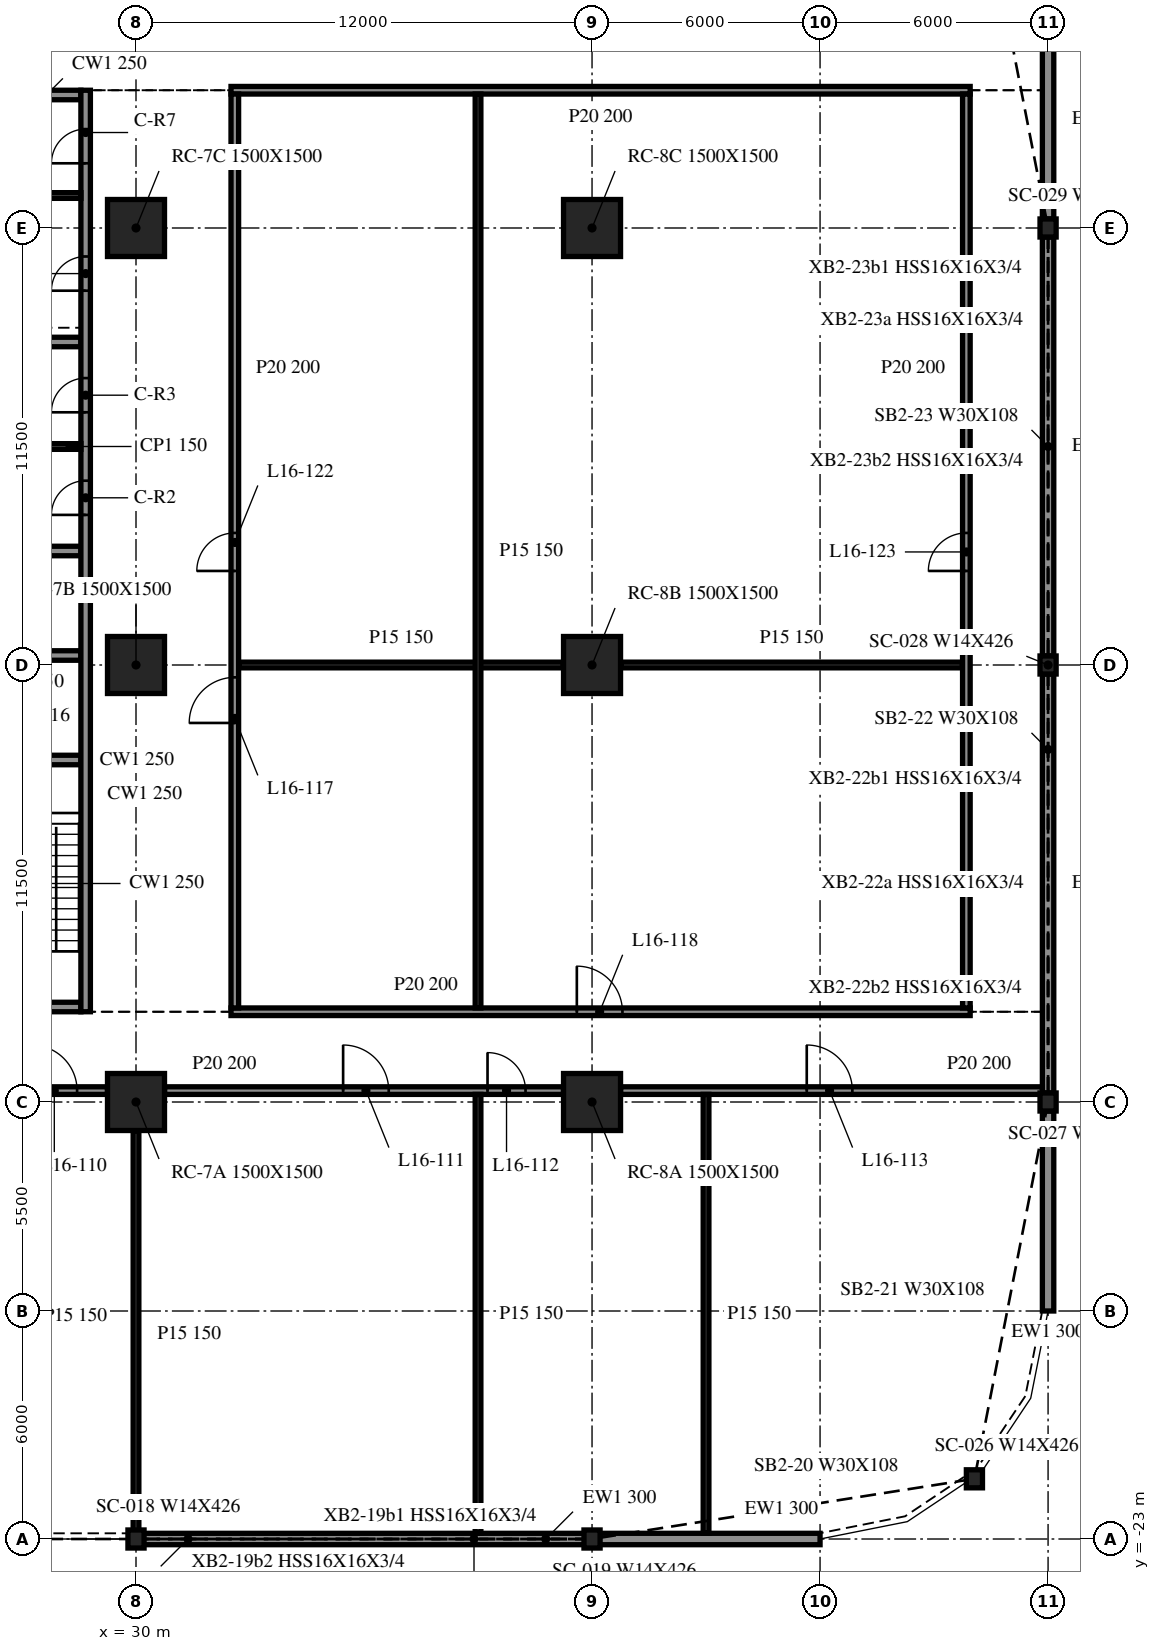
"""IFC4 building model, lengths in metres.
Left out: names, types, materials, properties, quantities, classifications, styles, units other than length and angle.
Written with IfcOpenShell. Run it as: python <this file> out.ifc"""

import sys

from ifc_helpers import new_model, si_unit, direction, frame, frame_2d, origin, origin_2d, place, context, subcontext, project, spatial, rectangle, i_section, extrude, element, fill, save


model = new_model("IFC4")
c1 = context("Model", 3, precision=1e-05, world=origin(), true_north=direction((0.0, 1.0)))
c2 = subcontext(c1, "Body", "Model", "MODEL_VIEW")
j1 = project(units=[si_unit("LENGTHUNIT", "METRE"), si_unit("PLANEANGLEUNIT", "RADIAN")], contexts=[c1])
p1 = place(None, origin())
s1 = spatial("IfcSite", under=j1, at=p1, CompositionType="ELEMENT")
p2 = place(p1, origin())
s2 = spatial("IfcBuilding", under=s1, at=p2, CompositionType="ELEMENT")
p3 = place(p2, frame((0.0, 0.0, 71.8)))
s3 = spatial("IfcBuildingStorey", under=s2, at=p3, CompositionType="ELEMENT", Elevation=71.8)
for number, where, z_axis, x_axis in (
    (1, (30.0, -11.5, -0.34), (0.0, 0.0, 1.0), (1.0, 0.0, 0.0)),
    (2, (30.0, 0.0, -0.34), (0.0, 0.0, 1.0), (1.0, 0.0, 0.0)),
    (3, (30.0, 11.5, -0.34), (0.0, 0.0, 1.0), (1.0, 0.0, 0.0)),
    (4, (42.0, -11.5, -0.34), (0.0, 0.0, 1.0), (1.0, 0.0, 0.0)),
    (5, (42.0, 0.0, -0.34), (0.0, 0.0, 1.0), (1.0, 0.0, 0.0)),
    (6, (42.0, 11.5, -0.34), (0.0, 0.0, 1.0), (1.0, 0.0, 0.0)),
):
    element("IfcColumn", number, at=place(p3, frame(where, z_axis=z_axis, x_axis=x_axis)), inside=s3, PredefinedType="COLUMN", context=c2, shape_type="SweptSolid", body=[
        extrude(rectangle(XDim=1.5, YDim=1.5, at=origin_2d()), origin(), (0.0, 0.0, 1.0), 4.3),
    ])
for number, where, z_axis, x_axis in (
    (7, (30.0, -23.0, -0.34), (0.0, 0.0, 1.0), (1.0, 0.0, 0.0)),
    (8, (42.0, -23.0, -0.34), (0.0, 0.0, 1.0), (1.0, 0.0, 0.0)),
    (9, (52.062, -21.416, -0.34), (0.0, 0.0, 1.0), (1.0, 0.0, 0.0)),
    (10, (54.0, -11.5, -0.34), (0.0, 0.0, 1.0), (1.0, 0.0, 0.0)),
    (11, (54.0, 0.0, -0.34), (0.0, 0.0, 1.0), (1.0, 0.0, 0.0)),
    (12, (54.0, 11.5, -0.34), (0.0, 0.0, 1.0), (1.0, 0.0, 0.0)),
):
    element("IfcColumn", number, at=place(p3, frame(where, z_axis=z_axis, x_axis=x_axis)), inside=s3, PredefinedType="COLUMN", context=c2, shape_type="SweptSolid", body=[
        extrude(i_section(OverallWidth=0.424, OverallDepth=0.475, WebThickness=0.048, FlangeThickness=0.077, at=origin_2d()), origin(), (0.0, 0.0, 1.0), 4.3),
    ])
p4 = place(p3, frame((30.024, -23.0, 0.0), z_axis=(0.0, 0.0, 1.0), x_axis=(1.0, 0.0, 0.0)))
e13 = element("IfcWall", 13, at=p4, inside=s3, PredefinedType="NOTDEFINED", context=c2, shape_type="SweptSolid", body=[
    extrude(rectangle(XDim=11.952, YDim=0.3, at=frame_2d((5.976, 0.0))), origin(), (0.0, 0.0, 1.0), 3.203),
])
p5 = place(p3, frame((42.024, -23.0, 0.0), z_axis=(0.0, 0.0, 1.0), x_axis=(1.0, 0.0, 0.0)))
e14 = element("IfcWall", 14, at=p5, inside=s3, PredefinedType="NOTDEFINED", context=c2, shape_type="SweptSolid", body=[
    extrude(rectangle(XDim=5.976, YDim=0.3, at=frame_2d((2.988, 0.0))), origin(), (0.0, 0.0, 1.0), 3.203),
])
p6 = place(p3, frame((54.0, -17.0, 0.0), z_axis=(0.0, 0.0, 1.0), x_axis=(0.0, 1.0, 0.0)))
e15 = element("IfcWall", 15, at=p6, inside=s3, PredefinedType="NOTDEFINED", context=c2, shape_type="SweptSolid", body=[
    extrude(rectangle(XDim=5.262, YDim=0.3, at=frame_2d((2.631, 0.0))), origin(), (0.0, 0.0, 1.0), 3.203),
])
for number, where, z_axis, x_axis in (
    (16, (54.0, -11.262, 0.0), (0.0, 0.0, 1.0), (0.0, 1.0, 0.0)),
    (17, (54.0, 0.238, 0.0), (0.0, 0.0, 1.0), (0.0, 1.0, 0.0)),
):
    element("IfcWall", number, at=place(p3, frame(where, z_axis=z_axis, x_axis=x_axis)), inside=s3, PredefinedType="NOTDEFINED", context=c2, shape_type="SweptSolid", body=[
        extrude(rectangle(XDim=11.024, YDim=0.3, at=frame_2d((5.512, 0.0))), origin(), (0.0, 0.0, 1.0), 3.203),
    ])
p7 = place(p3, frame((54.0, 11.738, 0.0), z_axis=(0.0, 0.0, 1.0), x_axis=(0.0, 1.0, 0.0)))
e18 = element("IfcWall", 18, at=p7, inside=s3, PredefinedType="NOTDEFINED", context=c2, shape_type="SweptSolid", body=[
    extrude(rectangle(XDim=5.262, YDim=0.3, at=frame_2d((2.631, 0.0))), origin(), (0.0, 0.0, 1.0), 3.203),
])
p8 = place(p3, frame((28.675, -9.125, 0.0), z_axis=(0.0, 0.0, 1.0), x_axis=(0.0, 1.0, 0.0)))
e19 = element("IfcWall", 19, at=p8, inside=s3, PredefinedType="SOLIDWALL", context=c2, shape_type="SweptSolid", body=[
    extrude(rectangle(XDim=24.25, YDim=0.25, at=frame_2d((12.125, 0.0))), origin(), (0.0, 0.0, 1.0), 3.96),
])
p9 = place(p8, frame((13.075, 0.0, 0.0)))
e20 = element("IfcOpeningElement", 20, at=p9, cuts=e19, PredefinedType="OPENING", context=c2, shape_type="SweptSolid", body=[
    extrude(rectangle(XDim=0.9, YDim=2.1, at=frame_2d((0.45, 1.05))), frame((0.0, 0.135, 0.0), z_axis=(0.0, -1.0, 0.0), x_axis=(1.0, 0.0, 0.0)), (0.0, 0.0, 1.0), 0.27),
])
p10 = place(p8, frame((15.775, 0.0, 0.0)))
e21 = element("IfcOpeningElement", 21, at=p10, cuts=e19, PredefinedType="OPENING", context=c2, shape_type="SweptSolid", body=[
    extrude(rectangle(XDim=0.9, YDim=2.1, at=frame_2d((0.45, 1.05))), frame((0.0, 0.135, 0.0), z_axis=(0.0, -1.0, 0.0), x_axis=(1.0, 0.0, 0.0)), (0.0, 0.0, 1.0), 0.27),
])
p11 = place(p8, frame((18.975, 0.0, 0.0)))
e22 = element("IfcOpeningElement", 22, at=p11, cuts=e19, PredefinedType="OPENING", context=c2, shape_type="SweptSolid", body=[
    extrude(rectangle(XDim=0.9, YDim=2.1, at=frame_2d((0.45, 1.05))), frame((0.0, 0.135, 0.0), z_axis=(0.0, -1.0, 0.0), x_axis=(1.0, 0.0, 0.0)), (0.0, 0.0, 1.0), 0.27),
])
p12 = place(p8, frame((22.327, 0.0, 0.0)))
e23 = element("IfcOpeningElement", 23, at=p12, cuts=e19, PredefinedType="OPENING", context=c2, shape_type="SweptSolid", body=[
    extrude(rectangle(XDim=0.9, YDim=2.1, at=frame_2d((0.45, 1.05))), frame((0.0, 0.135, 0.0), z_axis=(0.0, -1.0, 0.0), x_axis=(1.0, 0.0, 0.0)), (0.0, 0.0, 1.0), 0.27),
])
p13 = place(p3, frame((28.55, -9.0, 0.0), z_axis=(0.0, 0.0, 1.0), x_axis=(-1.0, 0.0, 0.0)))
e24 = element("IfcWall", 24, at=p13, inside=s3, PredefinedType="SOLIDWALL", context=c2, shape_type="SweptSolid", body=[
    extrude(rectangle(XDim=9.1, YDim=0.25, at=frame_2d((4.55, 0.0))), origin(), (0.0, 0.0, 1.0), 3.96),
])
p14 = place(p13, frame((3.65, 0.0, 0.0)))
e25 = element("IfcOpeningElement", 25, at=p14, cuts=e24, PredefinedType="OPENING", context=c2, shape_type="SweptSolid", body=[
    extrude(rectangle(XDim=1.8, YDim=2.1, at=frame_2d((0.9, 1.05))), frame((0.0, 0.135, 0.0), z_axis=(0.0, -1.0, 0.0), x_axis=(1.0, 0.0, 0.0)), (0.0, 0.0, 1.0), 0.27),
])
p15 = place(p3, frame((19.45, 15.0, 0.0), z_axis=(0.0, 0.0, 1.0), x_axis=(1.0, 0.0, 0.0)))
e26 = element("IfcWall", 26, at=p15, inside=s3, PredefinedType="SOLIDWALL", context=c2, shape_type="SweptSolid", body=[
    extrude(rectangle(XDim=9.1, YDim=0.25, at=frame_2d((4.55, 0.0))), origin(), (0.0, 0.0, 1.0), 3.96),
])
p16 = place(p15, frame((3.65, 0.0, 0.0)))
e27 = element("IfcOpeningElement", 27, at=p16, cuts=e26, PredefinedType="OPENING", context=c2, shape_type="SweptSolid", body=[
    extrude(rectangle(XDim=1.8, YDim=2.1, at=frame_2d((0.9, 1.05))), frame((0.0, 0.135, 0.0), z_axis=(0.0, -1.0, 0.0), x_axis=(1.0, 0.0, 0.0)), (0.0, 0.0, 1.0), 0.27),
])
for number, where, z_axis, x_axis in (
    (28, (25.7, -2.5, 0.0), (0.0, 0.0, 1.0), (1.0, 0.0, 0.0)),
    (29, (25.7, 0.25, 0.0), (0.0, 0.0, 1.0), (1.0, 0.0, 0.0)),
    (30, (25.7, 3.0, 0.0), (0.0, 0.0, 1.0), (1.0, 0.0, 0.0)),
    (31, (25.7, 8.5, 0.0), (0.0, 0.0, 1.0), (1.0, 0.0, 0.0)),
):
    element("IfcWall", number, at=place(p3, frame(where, z_axis=z_axis, x_axis=x_axis)), inside=s3, PredefinedType="SOLIDWALL", context=c2, shape_type="SweptSolid", body=[
        extrude(rectangle(XDim=2.85, YDim=0.25, at=frame_2d((1.425, 0.0))), origin(), (0.0, 0.0, 1.0), 3.96),
    ])
for number, where, z_axis, x_axis in (
    (32, (25.7, 5.75, 0.0), (0.0, 0.0, 1.0), (1.0, 0.0, 0.0)),
    (33, (25.7, 12.355, 0.0), (0.0, 0.0, 1.0), (1.0, 0.0, 0.0)),
):
    element("IfcWall", number, at=place(p3, frame(where, z_axis=z_axis, x_axis=x_axis)), inside=s3, PredefinedType="PARTITIONING", context=c2, shape_type="SweptSolid", body=[
        extrude(rectangle(XDim=2.85, YDim=0.15, at=frame_2d((1.425, 0.0))), origin(), (0.0, 0.0, 1.0), 3.96),
    ])
p17 = place(p3, frame((18.75, -11.2, 0.0), z_axis=(0.0, 0.0, 1.0), x_axis=(1.0, 0.0, 0.0)))
e34 = element("IfcWall", 34, at=p17, inside=s3, PredefinedType="PARTITIONING", context=c2, shape_type="SweptSolid", body=[
    extrude(rectangle(XDim=10.5, YDim=0.2, at=frame_2d((5.25, 0.0))), origin(), (0.0, 0.0, 1.0), 3.96),
])
p18 = place(p17, frame((4.7, 0.0, 0.0)))
e35 = element("IfcOpeningElement", 35, at=p18, cuts=e34, PredefinedType="OPENING", context=c2, shape_type="SweptSolid", body=[
    extrude(rectangle(XDim=1.2, YDim=2.1, at=frame_2d((0.6, 1.05))), frame((0.0, 0.11, 0.0), z_axis=(0.0, -1.0, 0.0), x_axis=(1.0, 0.0, 0.0)), (0.0, 0.0, 1.0), 0.22),
])
p19 = place(p17, frame((8.5, 0.0, 0.0)))
e36 = element("IfcOpeningElement", 36, at=p19, cuts=e34, PredefinedType="OPENING", context=c2, shape_type="SweptSolid", body=[
    extrude(rectangle(XDim=1.2, YDim=2.1, at=frame_2d((0.6, 1.05))), frame((0.0, 0.11, 0.0), z_axis=(0.0, -1.0, 0.0), x_axis=(1.0, 0.0, 0.0)), (0.0, 0.0, 1.0), 0.22),
])
p20 = place(p3, frame((30.75, -11.2, 0.0), z_axis=(0.0, 0.0, 1.0), x_axis=(1.0, 0.0, 0.0)))
e37 = element("IfcWall", 37, at=p20, inside=s3, PredefinedType="PARTITIONING", context=c2, shape_type="SweptSolid", body=[
    extrude(rectangle(XDim=10.5, YDim=0.2, at=frame_2d((5.25, 0.0))), origin(), (0.0, 0.0, 1.0), 3.96),
])
p21 = place(p20, frame((4.7, 0.0, 0.0)))
e38 = element("IfcOpeningElement", 38, at=p21, cuts=e37, PredefinedType="OPENING", context=c2, shape_type="SweptSolid", body=[
    extrude(rectangle(XDim=1.2, YDim=2.1, at=frame_2d((0.6, 1.05))), frame((0.0, 0.11, 0.0), z_axis=(0.0, -1.0, 0.0), x_axis=(1.0, 0.0, 0.0)), (0.0, 0.0, 1.0), 0.22),
])
p22 = place(p20, frame((8.5, 0.0, 0.0)))
e39 = element("IfcOpeningElement", 39, at=p22, cuts=e37, PredefinedType="OPENING", context=c2, shape_type="SweptSolid", body=[
    extrude(rectangle(XDim=1.0, YDim=2.1, at=frame_2d((0.5, 1.05))), frame((0.0, 0.11, 0.0), z_axis=(0.0, -1.0, 0.0), x_axis=(1.0, 0.0, 0.0)), (0.0, 0.0, 1.0), 0.22),
])
p23 = place(p3, frame((42.75, -11.2, 0.0), z_axis=(0.0, 0.0, 1.0), x_axis=(1.0, 0.0, 0.0)))
e40 = element("IfcWall", 40, at=p23, inside=s3, PredefinedType="PARTITIONING", context=c2, shape_type="SweptSolid", body=[
    extrude(rectangle(XDim=11.1, YDim=0.2, at=frame_2d((5.55, 0.0))), origin(), (0.0, 0.0, 1.0), 3.96),
])
p24 = place(p23, frame((4.9, 0.0, 0.0)))
e41 = element("IfcOpeningElement", 41, at=p24, cuts=e40, PredefinedType="OPENING", context=c2, shape_type="SweptSolid", body=[
    extrude(rectangle(XDim=1.2, YDim=2.1, at=frame_2d((0.6, 1.05))), frame((0.0, 0.11, 0.0), z_axis=(0.0, -1.0, 0.0), x_axis=(1.0, 0.0, 0.0)), (0.0, 0.0, 1.0), 0.22),
])
p25 = place(p3, frame((32.5, -9.125, 0.0), z_axis=(0.0, 0.0, 1.0), x_axis=(1.0, 0.0, 0.0)))
e42 = element("IfcWall", 42, at=p25, inside=s3, PredefinedType="PARTITIONING", context=c2, shape_type="SweptSolid", body=[
    extrude(rectangle(XDim=19.45, YDim=0.2, at=frame_2d((9.725, 0.0))), origin(), (0.0, 0.0, 1.0), 3.96),
])
p26 = place(p25, frame((9.1, 0.0, 0.0)))
e43 = element("IfcOpeningElement", 43, at=p26, cuts=e42, PredefinedType="OPENING", context=c2, shape_type="SweptSolid", body=[
    extrude(rectangle(XDim=1.2, YDim=2.1, at=frame_2d((0.6, 1.05))), frame((0.0, 0.11, 0.0), z_axis=(0.0, -1.0, 0.0), x_axis=(1.0, 0.0, 0.0)), (0.0, 0.0, 1.0), 0.22),
])
p27 = place(p3, frame((32.7, 0.0, 0.0), z_axis=(0.0, 0.0, 1.0), x_axis=(1.0, 0.0, 0.0)))
e44 = element("IfcWall", 44, at=p27, inside=s3, PredefinedType="PARTITIONING", context=c2, shape_type="SweptSolid", body=[
    extrude(rectangle(XDim=8.55, YDim=0.15, at=frame_2d((4.275, 0.0))), origin(), (0.0, 0.0, 1.0), 3.96),
])
p28 = place(p3, frame((42.75, 0.0, 0.0), z_axis=(0.0, 0.0, 1.0), x_axis=(1.0, 0.0, 0.0)))
e45 = element("IfcWall", 45, at=p28, inside=s3, PredefinedType="PARTITIONING", context=c2, shape_type="SweptSolid", body=[
    extrude(rectangle(XDim=9.0, YDim=0.15, at=frame_2d((4.5, 0.0))), origin(), (0.0, 0.0, 1.0), 3.96),
])
p29 = place(p3, frame((32.5, 15.125, 0.0), z_axis=(0.0, 0.0, 1.0), x_axis=(1.0, 0.0, 0.0)))
e46 = element("IfcWall", 46, at=p29, inside=s3, PredefinedType="PARTITIONING", context=c2, shape_type="SweptSolid", body=[
    extrude(rectangle(XDim=19.45, YDim=0.2, at=frame_2d((9.725, 0.0))), origin(), (0.0, 0.0, 1.0), 3.96),
])
p30 = place(p3, frame((30.0, -22.975, 0.0), z_axis=(0.0, 0.0, 1.0), x_axis=(0.0, 1.0, 0.0)))
e47 = element("IfcWall", 47, at=p30, inside=s3, PredefinedType="PARTITIONING", context=c2, shape_type="SweptSolid", body=[
    extrude(rectangle(XDim=10.725, YDim=0.15, at=frame_2d((5.363, 0.0))), origin(), (0.0, 0.0, 1.0), 3.96),
])
p31 = place(p3, frame((32.6, -9.025, 0.0), z_axis=(0.0, 0.0, 1.0), x_axis=(0.0, 1.0, 0.0)))
e48 = element("IfcWall", 48, at=p31, inside=s3, PredefinedType="PARTITIONING", context=c2, shape_type="SweptSolid", body=[
    extrude(rectangle(XDim=24.05, YDim=0.2, at=frame_2d((12.025, 0.0))), origin(), (0.0, 0.0, 1.0), 3.96),
])
p32 = place(p31, frame((7.5, 0.0, 0.0)))
e49 = element("IfcOpeningElement", 49, at=p32, cuts=e48, PredefinedType="OPENING", context=c2, shape_type="SweptSolid", body=[
    extrude(rectangle(XDim=1.2, YDim=2.1, at=frame_2d((0.6, 1.05))), frame((0.0, 0.11, 0.0), z_axis=(0.0, -1.0, 0.0), x_axis=(1.0, 0.0, 0.0)), (0.0, 0.0, 1.0), 0.22),
])
p33 = place(p31, frame((11.5, 0.0, 0.0)))
e50 = element("IfcOpeningElement", 50, at=p33, cuts=e48, PredefinedType="OPENING", context=c2, shape_type="SweptSolid", body=[
    extrude(rectangle(XDim=1.0, YDim=2.1, at=frame_2d((0.5, 1.05))), frame((0.0, 0.11, 0.0), z_axis=(0.0, -1.0, 0.0), x_axis=(1.0, 0.0, 0.0)), (0.0, 0.0, 1.0), 0.22),
])
p34 = place(p3, frame((39.0, -22.85, 0.0), z_axis=(0.0, 0.0, 1.0), x_axis=(0.0, 1.0, 0.0)))
e51 = element("IfcWall", 51, at=p34, inside=s3, PredefinedType="PARTITIONING", context=c2, shape_type="SweptSolid", body=[
    extrude(rectangle(XDim=11.55, YDim=0.15, at=frame_2d((5.775, 0.0))), origin(), (0.0, 0.0, 1.0), 3.96),
])
p35 = place(p3, frame((39.0, -9.025, 0.0), z_axis=(0.0, 0.0, 1.0), x_axis=(0.0, 1.0, 0.0)))
e52 = element("IfcWall", 52, at=p35, inside=s3, PredefinedType="PARTITIONING", context=c2, shape_type="SweptSolid", body=[
    extrude(rectangle(XDim=24.05, YDim=0.15, at=frame_2d((12.025, 0.0))), origin(), (0.0, 0.0, 1.0), 3.96),
])
p36 = place(p3, frame((45.0, -22.85, 0.0), z_axis=(0.0, 0.0, 1.0), x_axis=(0.0, 1.0, 0.0)))
e53 = element("IfcWall", 53, at=p36, inside=s3, PredefinedType="PARTITIONING", context=c2, shape_type="SweptSolid", body=[
    extrude(rectangle(XDim=11.55, YDim=0.15, at=frame_2d((5.775, 0.0))), origin(), (0.0, 0.0, 1.0), 3.96),
])
p37 = place(p3, frame((51.85, -9.025, 0.0), z_axis=(0.0, 0.0, 1.0), x_axis=(0.0, 1.0, 0.0)))
e54 = element("IfcWall", 54, at=p37, inside=s3, PredefinedType="PARTITIONING", context=c2, shape_type="SweptSolid", body=[
    extrude(rectangle(XDim=24.05, YDim=0.2, at=frame_2d((12.025, 0.0))), origin(), (0.0, 0.0, 1.0), 3.96),
])
p38 = place(p37, frame((11.5, 0.0, 0.0)))
e55 = element("IfcOpeningElement", 55, at=p38, cuts=e54, PredefinedType="OPENING", context=c2, shape_type="SweptSolid", body=[
    extrude(rectangle(XDim=1.0, YDim=2.1, at=frame_2d((0.5, 1.05))), frame((0.0, 0.11, 0.0), z_axis=(0.0, -1.0, 0.0), x_axis=(1.0, 0.0, 0.0)), (0.0, 0.0, 1.0), 0.22),
])
p39 = place(p9, origin())
e56 = element("IfcDoor", 56, at=p39, inside=s3, OperationType="SINGLE_SWING_RIGHT", PredefinedType="DOOR", context=c2, shape_type="SweptSolid", body=[
    extrude(rectangle(XDim=0.9, YDim=2.1, at=frame_2d((0.45, 1.05))), frame((0.0, 0.025, 0.0), z_axis=(0.0, -1.0, 0.0), x_axis=(1.0, 0.0, 0.0)), (0.0, 0.0, 1.0), 0.05),
])
fill(e20, e56)
p40 = place(p10, origin())
e57 = element("IfcDoor", 57, at=p40, inside=s3, OperationType="SINGLE_SWING_LEFT", PredefinedType="DOOR", context=c2, shape_type="SweptSolid", body=[
    extrude(rectangle(XDim=0.9, YDim=2.1, at=frame_2d((0.45, 1.05))), frame((0.0, 0.025, 0.0), z_axis=(0.0, -1.0, 0.0), x_axis=(1.0, 0.0, 0.0)), (0.0, 0.0, 1.0), 0.05),
])
fill(e21, e57)
p41 = place(p11, origin())
e58 = element("IfcDoor", 58, at=p41, inside=s3, OperationType="SINGLE_SWING_RIGHT", PredefinedType="DOOR", context=c2, shape_type="SweptSolid", body=[
    extrude(rectangle(XDim=0.9, YDim=2.1, at=frame_2d((0.45, 1.05))), frame((0.0, 0.025, 0.0), z_axis=(0.0, -1.0, 0.0), x_axis=(1.0, 0.0, 0.0)), (0.0, 0.0, 1.0), 0.05),
])
fill(e22, e58)
p42 = place(p12, origin())
e59 = element("IfcDoor", 59, at=p42, inside=s3, OperationType="SINGLE_SWING_LEFT", PredefinedType="DOOR", context=c2, shape_type="SweptSolid", body=[
    extrude(rectangle(XDim=0.9, YDim=2.1, at=frame_2d((0.45, 1.05))), frame((0.0, 0.025, 0.0), z_axis=(0.0, -1.0, 0.0), x_axis=(1.0, 0.0, 0.0)), (0.0, 0.0, 1.0), 0.05),
])
fill(e23, e59)
p43 = place(p19, origin())
e60 = element("IfcDoor", 60, at=p43, inside=s3, OperationType="SINGLE_SWING_LEFT", PredefinedType="DOOR", context=c2, shape_type="SweptSolid", body=[
    extrude(rectangle(XDim=1.2, YDim=2.1, at=frame_2d((0.6, 1.05))), frame((0.0, 0.025, 0.0), z_axis=(0.0, -1.0, 0.0), x_axis=(1.0, 0.0, 0.0)), (0.0, 0.0, 1.0), 0.05),
])
fill(e36, e60)
p44 = place(p21, origin())
e61 = element("IfcDoor", 61, at=p44, inside=s3, OperationType="SINGLE_SWING_LEFT", PredefinedType="DOOR", context=c2, shape_type="SweptSolid", body=[
    extrude(rectangle(XDim=1.2, YDim=2.1, at=frame_2d((0.6, 1.05))), frame((0.0, 0.025, 0.0), z_axis=(0.0, -1.0, 0.0), x_axis=(1.0, 0.0, 0.0)), (0.0, 0.0, 1.0), 0.05),
])
fill(e38, e61)
p45 = place(p22, origin())
e62 = element("IfcDoor", 62, at=p45, inside=s3, OperationType="SINGLE_SWING_LEFT", PredefinedType="DOOR", context=c2, shape_type="SweptSolid", body=[
    extrude(rectangle(XDim=1.0, YDim=2.1, at=frame_2d((0.5, 1.05))), frame((0.0, 0.025, 0.0), z_axis=(0.0, -1.0, 0.0), x_axis=(1.0, 0.0, 0.0)), (0.0, 0.0, 1.0), 0.05),
])
fill(e39, e62)
p46 = place(p24, origin())
e63 = element("IfcDoor", 63, at=p46, inside=s3, OperationType="SINGLE_SWING_RIGHT", PredefinedType="DOOR", context=c2, shape_type="SweptSolid", body=[
    extrude(rectangle(XDim=1.2, YDim=2.1, at=frame_2d((0.6, 1.05))), frame((0.0, 0.025, 0.0), z_axis=(0.0, -1.0, 0.0), x_axis=(1.0, 0.0, 0.0)), (0.0, 0.0, 1.0), 0.05),
])
fill(e41, e63)
p47 = place(p32, origin())
e64 = element("IfcDoor", 64, at=p47, inside=s3, OperationType="SINGLE_SWING_RIGHT", PredefinedType="DOOR", context=c2, shape_type="SweptSolid", body=[
    extrude(rectangle(XDim=1.2, YDim=2.1, at=frame_2d((0.6, 1.05))), frame((0.0, 0.025, 0.0), z_axis=(0.0, -1.0, 0.0), x_axis=(1.0, 0.0, 0.0)), (0.0, 0.0, 1.0), 0.05),
])
fill(e49, e64)
p48 = place(p26, origin())
e65 = element("IfcDoor", 65, at=p48, inside=s3, OperationType="SINGLE_SWING_LEFT", PredefinedType="DOOR", context=c2, shape_type="SweptSolid", body=[
    extrude(rectangle(XDim=1.2, YDim=2.1, at=frame_2d((0.6, 1.05))), frame((0.0, 0.025, 0.0), z_axis=(0.0, -1.0, 0.0), x_axis=(1.0, 0.0, 0.0)), (0.0, 0.0, 1.0), 0.05),
])
fill(e43, e65)
p49 = place(p33, origin())
e66 = element("IfcDoor", 66, at=p49, inside=s3, OperationType="SINGLE_SWING_RIGHT", PredefinedType="DOOR", context=c2, shape_type="SweptSolid", body=[
    extrude(rectangle(XDim=1.0, YDim=2.1, at=frame_2d((0.5, 1.05))), frame((0.0, 0.025, 0.0), z_axis=(0.0, -1.0, 0.0), x_axis=(1.0, 0.0, 0.0)), (0.0, 0.0, 1.0), 0.05),
])
fill(e50, e66)
p50 = place(p38, origin())
e67 = element("IfcDoor", 67, at=p50, inside=s3, OperationType="SINGLE_SWING_LEFT", PredefinedType="DOOR", context=c2, shape_type="SweptSolid", body=[
    extrude(rectangle(XDim=1.0, YDim=2.1, at=frame_2d((0.5, 1.05))), frame((0.0, 0.025, 0.0), z_axis=(0.0, -1.0, 0.0), x_axis=(1.0, 0.0, 0.0)), (0.0, 0.0, 1.0), 0.05),
])
fill(e55, e67)
save(model, sys.argv[1])
